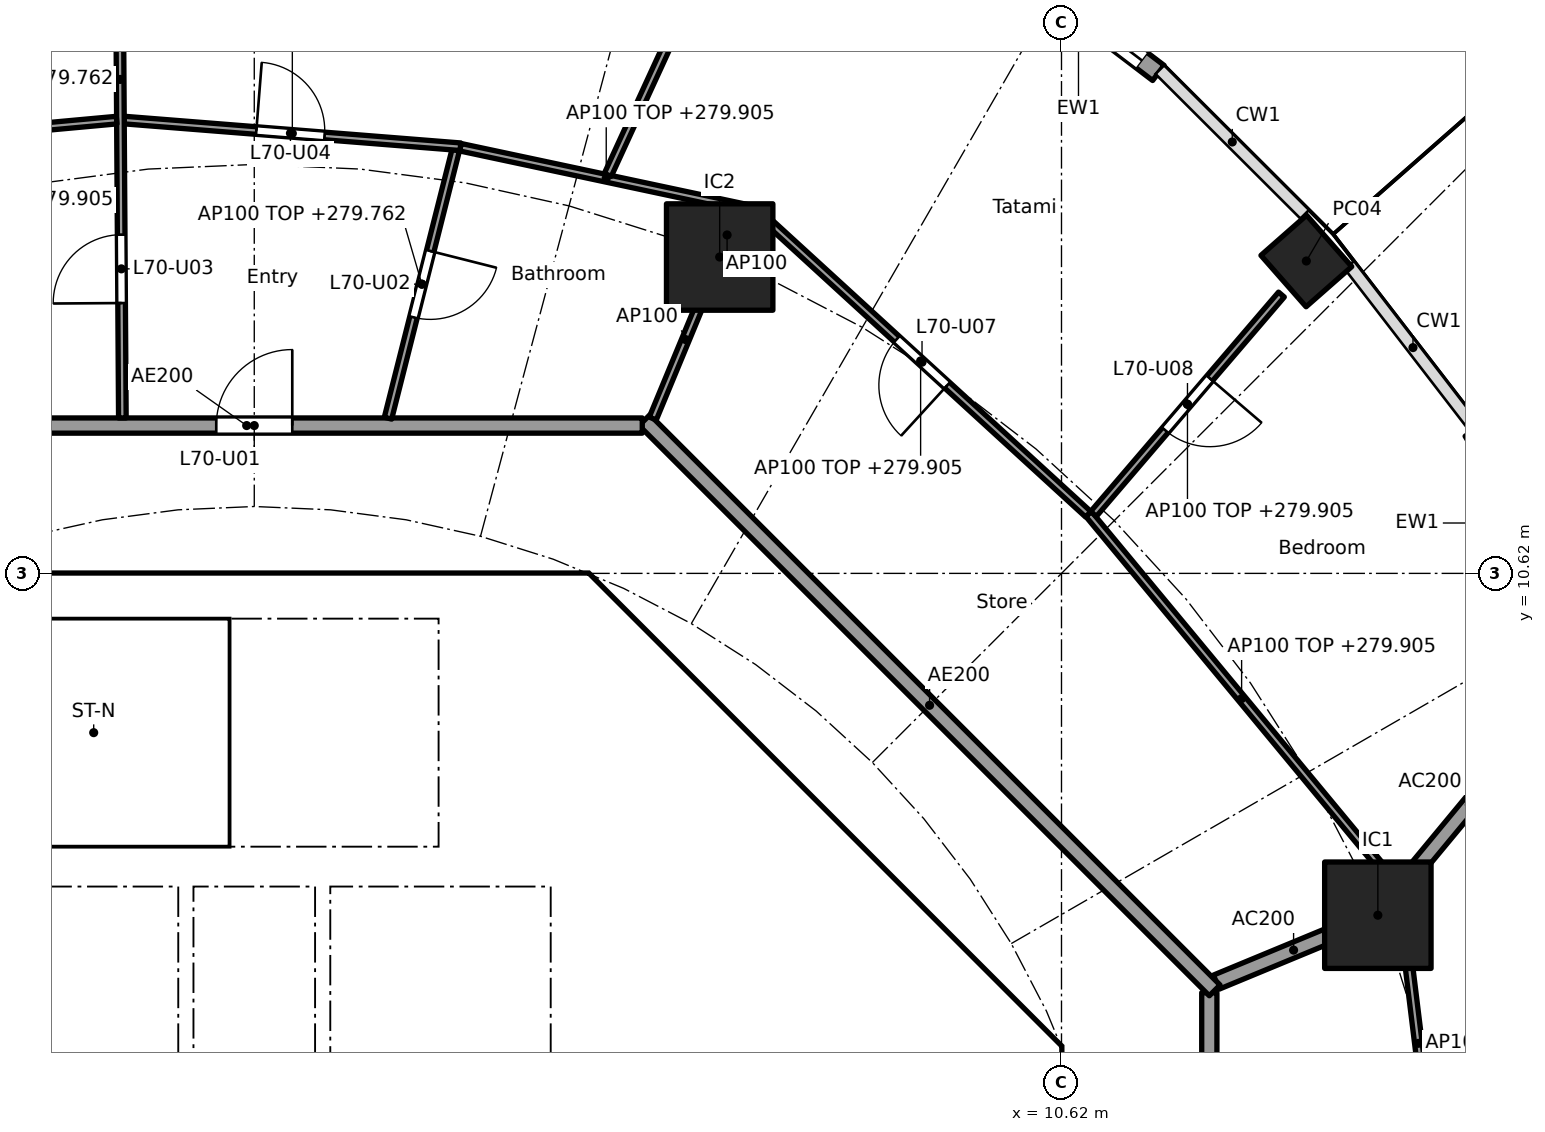
"""IFC4 building model, lengths in metres.
Left out: names, types, materials, properties, quantities, classifications, styles, units other than length and angle.
Written with IfcOpenShell. Run it as: python <this file> out.ifc"""

import sys

from ifc_helpers import new_model, si_unit, direction, frame, frame_2d, origin, origin_2d, place, context, subcontext, project, spatial, polyline, rectangle, hollow_rectangle, outline, extrude, element, fill, save


model = new_model("IFC4")
c1 = context("Model", 3, precision=1e-05, world=origin(), true_north=direction((0.0, 1.0)))
c2 = subcontext(c1, "Body", "Model", "MODEL_VIEW")
j1 = project(units=[si_unit("LENGTHUNIT", "METRE"), si_unit("PLANEANGLEUNIT", "RADIAN")], contexts=[c1])
p1 = place(None, origin())
s1 = spatial("IfcSite", under=j1, at=p1, CompositionType="ELEMENT")
p2 = place(p1, origin())
s2 = spatial("IfcBuilding", under=s1, at=p2, CompositionType="ELEMENT")
p3 = place(p2, frame((0.0, 0.0, 277.0)))
s3 = spatial("IfcBuildingStorey", under=s2, at=p3, CompositionType="ELEMENT", Elevation=277.0)
p4 = place(p3, frame((13.841, 14.73, 0.0), z_axis=(0.0, 0.0, 1.0), x_axis=(-0.660114607735, 0.751164898445, 0.0)))
e1 = element("IfcColumn", 1, at=p4, inside=s3, PredefinedType="COLUMN", context=c2, shape_type="SweptSolid", body=[
    extrude(hollow_rectangle(XDim=0.9, YDim=0.8, WallThickness=0.028, at=origin_2d()), origin(), (0.0, 0.0, 1.0), 3.7),
])
for number, where, z_axis, x_axis in (
    (2, (14.782, 6.123, 0.0), (0.0, 0.0, 1.0), (1.0, 0.0, 0.0)),
    (3, (6.123, 14.782, 0.0), (0.0, 0.0, 1.0), (1.0, 0.0, 0.0)),
):
    element("IfcColumn", number, at=place(p3, frame(where, z_axis=z_axis, x_axis=x_axis)), inside=s3, PredefinedType="COLUMN", context=c2, shape_type="SweptSolid", body=[
        extrude(rectangle(XDim=1.4, YDim=1.4, at=origin_2d()), origin(), (0.0, 0.0, 1.0), 3.7),
    ])
p5 = place(p3, frame((16.038, 12.489, 0.0), z_axis=(0.0, 0.0, 1.0), x_axis=(0.506371364425, -0.862315511452, 0.0)))
e4 = element("IfcWall", 4, at=p5, inside=s3, PredefinedType="SOLIDWALL", context=c2, shape_type="SweptSolid", body=[
    extrude(rectangle(XDim=2.796, YDim=0.25, at=frame_2d((1.398, 0.0))), origin(), (0.0, 0.0, 1.0), 3.44),
])
p6 = place(p5, frame((0.348, 0.0, 0.0)))
e5 = element("IfcOpeningElement", 5, at=p6, cuts=e4, PredefinedType="OPENING", context=c2, shape_type="SweptSolid", body=[
    extrude(rectangle(XDim=2.1, YDim=2.4, at=frame_2d((1.05, 1.2))), frame((0.0, 0.135, 0.0), z_axis=(0.0, -1.0, 0.0), x_axis=(1.0, 0.0, 0.0)), (0.0, 0.0, 1.0), 0.27),
])
p7 = place(p3, frame((9.792, 18.802, 0.0), z_axis=(0.0, 0.0, 1.0), x_axis=(0.796010739377, -0.605282498339, 0.0)))
e6 = element("IfcWall", 6, at=p7, inside=s3, PredefinedType="SOLIDWALL", context=c2, shape_type="SweptSolid", body=[
    extrude(rectangle(XDim=2.641, YDim=0.25, at=frame_2d((1.32, 0.0))), origin(), (0.0, 0.0, 1.0), 3.44),
])
p8 = place(p7, frame((0.27, 0.0, 0.0)))
e7 = element("IfcOpeningElement", 7, at=p8, cuts=e6, PredefinedType="OPENING", context=c2, shape_type="SweptSolid", body=[
    extrude(rectangle(XDim=2.1, YDim=2.4, at=frame_2d((1.05, 1.2))), frame((0.0, 0.135, 0.0), z_axis=(0.0, -1.0, 0.0), x_axis=(1.0, 0.0, 0.0)), (0.0, 0.0, 1.0), 0.27),
])
p9 = place(p3, frame((9.988, 4.613, 0.0), z_axis=(0.0, 0.0, 1.0), x_axis=(-0.707106781187, 0.707106781187, 0.0)))
e8 = element("IfcWall", 8, at=p9, inside=s3, PredefinedType="SHEAR", context=c2, shape_type="SweptSolid", body=[
    extrude(rectangle(XDim=7.602, YDim=0.6, at=frame_2d((3.801, 0.0))), origin(), (0.0, 0.0, 1.0), 3.44),
])
p10 = place(p9, frame((3.201, 0.0, 0.0)))
e9 = element("IfcOpeningElement", 9, at=p10, cuts=e8, PredefinedType="OPENING", context=c2, shape_type="SweptSolid", body=[
    extrude(rectangle(XDim=1.2, YDim=2.1, at=frame_2d((0.6, 1.05))), frame((0.0, 0.31, 0.0), z_axis=(0.0, -1.0, 0.0), x_axis=(1.0, 0.0, 0.0)), (0.0, 0.0, 1.0), 0.62),
])
p11 = place(p3, frame((4.0, 4.3, 0.0), z_axis=(0.0, 0.0, 1.0), x_axis=(0.0, 1.0, 0.0)))
e10 = element("IfcWall", 10, at=p11, inside=s3, PredefinedType="SOLIDWALL", context=c2, shape_type="SweptSolid", body=[
    extrude(rectangle(XDim=2.2, YDim=0.2, at=frame_2d((1.1, 0.0))), origin(), (0.0, 0.0, 1.0), 3.44),
])
p12 = place(p11, frame((0.55, 0.0, 0.0)))
e11 = element("IfcOpeningElement", 11, at=p12, cuts=e10, PredefinedType="OPENING", context=c2, shape_type="SweptSolid", body=[
    extrude(rectangle(XDim=1.1, YDim=2.1, at=frame_2d((0.55, 1.05))), frame((0.0, 0.11, 0.0), z_axis=(0.0, -1.0, 0.0), x_axis=(1.0, 0.0, 0.0)), (0.0, 0.0, 1.0), 0.22),
])
p13 = place(p3, frame((4.0, 7.025, 0.0), z_axis=(0.0, 0.0, 1.0), x_axis=(0.0, 1.0, 0.0)))
e12 = element("IfcWall", 12, at=p13, inside=s3, PredefinedType="SOLIDWALL", context=c2, shape_type="SweptSolid", body=[
    extrude(rectangle(XDim=3.0, YDim=0.2, at=frame_2d((1.5, 0.0))), origin(), (0.0, 0.0, 1.0), 3.44),
])
p14 = place(p13, frame((0.925, 0.0, 0.0)))
e13 = element("IfcOpeningElement", 13, at=p14, cuts=e12, PredefinedType="OPENING", context=c2, shape_type="SweptSolid", body=[
    extrude(rectangle(XDim=1.1, YDim=2.1, at=frame_2d((0.55, 1.05))), frame((0.0, 0.11, 0.0), z_axis=(0.0, -1.0, 0.0), x_axis=(1.0, 0.0, 0.0)), (0.0, 0.0, 1.0), 0.22),
])
p15 = place(p3, origin())
e14 = element("IfcWall", 14, at=p15, inside=s3, PredefinedType="SHEAR", context=c2, shape_type="SweptSolid", body=[
    extrude(outline(polyline([(-4.152, 10.025), (-4.401, 9.776), (-4.825, 10.2), (-4.401, 10.625), (4.401, 10.625), (4.825, 10.2), (4.401, 9.776), (4.152, 10.025), (-4.152, 10.025)])), origin(), (0.0, 0.0, 1.0), 3.44),
])
p16 = place(p3, origin())
e15 = element("IfcWall", 15, at=p16, inside=s3, PredefinedType="SHEAR", context=c2, shape_type="SweptSolid", body=[
    extrude(outline(polyline([(9.776, -4.401), (10.025, -4.152), (10.025, -3.801), (10.025, 4.152), (9.776, 4.401), (10.2, 4.825), (10.625, 4.401), (10.625, -4.401), (10.2, -4.825), (9.776, -4.401)])), origin(), (0.0, 0.0, 1.0), 3.44),
])
for number, where, z_axis, x_axis in (
    (16, (-0.9, 4.3, 0.0), (0.0, 0.0, 1.0), (0.0, 1.0, 0.0)),
    (17, (0.9, 4.3, 0.0), (0.0, 0.0, 1.0), (0.0, 1.0, 0.0)),
):
    element("IfcWall", number, at=place(p3, frame(where, z_axis=z_axis, x_axis=x_axis)), inside=s3, PredefinedType="SOLIDWALL", context=c2, shape_type="SweptSolid", body=[
        extrude(rectangle(XDim=2.2, YDim=0.2, at=frame_2d((1.1, 0.0))), origin(), (0.0, 0.0, 1.0), 3.44),
    ])
p17 = place(p3, origin())
e18 = element("IfcWall", 18, at=p17, inside=s3, PredefinedType="SOLIDWALL", context=c2, shape_type="SweptSolid", body=[
    extrude(outline(polyline([(4.1, 6.5), (-4.1, 6.5), (-4.1, 7.025), (4.1, 7.025), (4.1, 6.5)])), origin(), (0.0, 0.0, 1.0), 3.44),
])
p18 = place(p3, frame((12.657, 5.243, 0.0), z_axis=(0.0, 0.0, 1.0), x_axis=(0.923853160736, 0.382747093259, 0.0)))
e19 = element("IfcWall", 19, at=p18, inside=s3, PredefinedType="PARTITIONING", context=c2, shape_type="SweptSolid", body=[
    extrude(rectangle(XDim=2.2, YDim=0.2, at=frame_2d((1.1, 0.0))), origin(), (0.0, 0.0, 1.0), 3.44),
])
p19 = place(p3, frame((14.814, 6.161, 0.0), z_axis=(0.0, 0.0, 1.0), x_axis=(0.638050520313, 0.769994502272, 0.0)))
e20 = element("IfcWall", 20, at=p19, inside=s3, PredefinedType="PARTITIONING", context=c2, shape_type="SweptSolid", body=[
    extrude(rectangle(XDim=3.673, YDim=0.2, at=frame_2d((1.836, 0.0))), origin(), (0.0, 0.0, 1.0), 3.44),
])
p20 = place(p3, frame((12.565, -5.104, 0.0), z_axis=(0.0, 0.0, 1.0), x_axis=(0.0, 1.0, 0.0)))
e21 = element("IfcWall", 21, at=p20, inside=s3, PredefinedType="PARTITIONING", context=c2, shape_type="SweptSolid", body=[
    extrude(rectangle(XDim=10.209, YDim=0.2, at=frame_2d((5.104, 0.0))), origin(), (0.0, 0.0, 1.0), 3.44),
])
p21 = place(p20, frame((4.604, 0.0, 0.0)))
e22 = element("IfcOpeningElement", 22, at=p21, cuts=e21, PredefinedType="OPENING", context=c2, shape_type="SweptSolid", body=[
    extrude(rectangle(XDim=1.0, YDim=2.1, at=frame_2d((0.5, 1.05))), frame((0.0, 0.11, 0.0), z_axis=(0.0, -1.0, 0.0), x_axis=(1.0, 0.0, 0.0)), (0.0, 0.0, 1.0), 0.22),
])
p22 = place(p3, frame((12.635, 5.134, 0.0), z_axis=(0.0, 0.0, 1.0), x_axis=(-0.707106781187, 0.707106781187, 0.0)))
e23 = element("IfcWall", 23, at=p22, inside=s3, PredefinedType="PARTITIONING", context=c2, shape_type="SweptSolid", body=[
    extrude(rectangle(XDim=10.609, YDim=0.2, at=frame_2d((5.305, 0.0))), origin(), (0.0, 0.0, 1.0), 3.44),
])
p23 = place(p3, frame((5.104, 12.565, 0.0), z_axis=(0.0, 0.0, 1.0), x_axis=(-1.0, 0.0, 0.0)))
e24 = element("IfcWall", 24, at=p23, inside=s3, PredefinedType="PARTITIONING", context=c2, shape_type="SweptSolid", body=[
    extrude(rectangle(XDim=10.409, YDim=0.2, at=frame_2d((5.205, 0.0))), origin(), (0.0, 0.0, 1.0), 3.44),
])
p24 = place(p23, frame((4.604, 0.0, 0.0)))
e25 = element("IfcOpeningElement", 25, at=p24, cuts=e24, PredefinedType="OPENING", context=c2, shape_type="SweptSolid", body=[
    extrude(rectangle(XDim=1.0, YDim=2.1, at=frame_2d((0.5, 1.05))), frame((0.0, 0.11, 0.0), z_axis=(0.0, -1.0, 0.0), x_axis=(1.0, 0.0, 0.0)), (0.0, 0.0, 1.0), 0.22),
])
p25 = place(p3, frame((15.552, 2.508, 0.0), z_axis=(0.0, 0.0, 1.0), x_axis=(-0.12196293976, 0.992534654974, 0.0)))
e26 = element("IfcWall", 26, at=p25, inside=s3, PredefinedType="PARTITIONING", context=c2, shape_type="SweptSolid", body=[
    extrude(rectangle(XDim=3.887, YDim=0.1, at=frame_2d((1.944, 0.0))), origin(), (0.0, 0.0, 1.0), 2.905),
])
p26 = place(p3, frame((15.002, 6.543, 0.0), z_axis=(0.0, 0.0, 1.0), x_axis=(-0.637932656528, 0.770092154054, 0.0)))
e27 = element("IfcWall", 27, at=p26, inside=s3, PredefinedType="PARTITIONING", context=c2, shape_type="SweptSolid", body=[
    extrude(rectangle(XDim=6.311, YDim=0.1, at=frame_2d((3.155, 0.0))), origin(), (0.0, 0.0, 1.0), 2.905),
])
p27 = place(p3, frame((11.041, 11.402, 0.0), z_axis=(0.0, 0.0, 1.0), x_axis=(0.650558544325, 0.759456108282, 0.0)))
e28 = element("IfcWall", 28, at=p27, inside=s3, PredefinedType="PARTITIONING", context=c2, shape_type="SweptSolid", body=[
    extrude(rectangle(XDim=3.8, YDim=0.1, at=frame_2d((1.9, 0.0))), origin(), (0.0, 0.0, 1.0), 2.905),
])
p28 = place(p27, frame((1.45, 0.0, 0.0)))
e29 = element("IfcOpeningElement", 29, at=p28, cuts=e28, PredefinedType="OPENING", context=c2, shape_type="SweptSolid", body=[
    extrude(rectangle(XDim=0.9, YDim=2.1, at=frame_2d((0.45, 1.05))), frame((0.0, 0.06, 0.0), z_axis=(0.0, -1.0, 0.0), x_axis=(1.0, 0.0, 0.0)), (0.0, 0.0, 1.0), 0.12),
])
p29 = place(p3, frame((10.972, 11.398, 0.0), z_axis=(0.0, 0.0, 1.0), x_axis=(-0.737838738013, 0.674977034193, 0.0)))
e30 = element("IfcWall", 30, at=p29, inside=s3, PredefinedType="PARTITIONING", context=c2, shape_type="SweptSolid", body=[
    extrude(rectangle(XDim=5.977, YDim=0.1, at=frame_2d((2.989, 0.0))), origin(), (0.0, 0.0, 1.0), 2.905),
])
p30 = place(p29, frame((2.514, 0.0, 0.0)))
e31 = element("IfcOpeningElement", 31, at=p30, cuts=e30, PredefinedType="OPENING", context=c2, shape_type="SweptSolid", body=[
    extrude(rectangle(XDim=0.9, YDim=2.1, at=frame_2d((0.45, 1.05))), frame((0.0, 0.06, 0.0), z_axis=(0.0, -1.0, 0.0), x_axis=(1.0, 0.0, 0.0)), (0.0, 0.0, 1.0), 0.12),
])
p31 = place(p3, frame((5.243, 12.657, 0.0), z_axis=(0.0, 0.0, 1.0), x_axis=(0.382719158442, 0.923864733477, 0.0)))
e32 = element("IfcWall", 32, at=p31, inside=s3, PredefinedType="PARTITIONING", context=c2, shape_type="SweptSolid", body=[
    extrude(rectangle(XDim=2.25, YDim=0.1, at=frame_2d((1.125, 0.0))), origin(), (0.0, 0.0, 1.0), 3.44),
])
p32 = place(p3, frame((6.55, 15.409, 0.0), z_axis=(0.0, 0.0, 1.0), x_axis=(-0.978051195976, 0.208364723621, 0.0)))
e33 = element("IfcWall", 33, at=p32, inside=s3, PredefinedType="PARTITIONING", context=c2, shape_type="SweptSolid", body=[
    extrude(rectangle(XDim=3.924, YDim=0.1, at=frame_2d((1.962, 0.0))), origin(), (0.0, 0.0, 1.0), 2.905),
])
p33 = place(p3, frame((4.651, 15.863, 0.0), z_axis=(0.0, 0.0, 1.0), x_axis=(0.41744196735, 0.908703584176, 0.0)))
e34 = element("IfcWall", 34, at=p33, inside=s3, PredefinedType="PARTITIONING", context=c2, shape_type="SweptSolid", body=[
    extrude(rectangle(XDim=5.242, YDim=0.1, at=frame_2d((2.621, 0.0))), origin(), (0.0, 0.0, 1.0), 2.983),
])
p34 = place(p33, frame((2.171, 0.0, 0.0)))
e35 = element("IfcOpeningElement", 35, at=p34, cuts=e34, PredefinedType="OPENING", context=c2, shape_type="SweptSolid", body=[
    extrude(rectangle(XDim=0.9, YDim=2.1, at=frame_2d((0.45, 1.05))), frame((0.0, 0.06, 0.0), z_axis=(0.0, -1.0, 0.0), x_axis=(1.0, 0.0, 0.0)), (0.0, 0.0, 1.0), 0.12),
])
p35 = place(p3, frame((1.759, 12.662, 0.0), z_axis=(0.0, 0.0, 1.0), x_axis=(0.244966765147, 0.969531476525, 0.0)))
e36 = element("IfcWall", 36, at=p35, inside=s3, PredefinedType="PARTITIONING", context=c2, shape_type="SweptSolid", body=[
    extrude(rectangle(XDim=3.638, YDim=0.1, at=frame_2d((1.819, 0.0))), origin(), (0.0, 0.0, 1.0), 2.762),
])
p36 = place(p35, frame((1.369, 0.0, 0.0)))
e37 = element("IfcOpeningElement", 37, at=p36, cuts=e36, PredefinedType="OPENING", context=c2, shape_type="SweptSolid", body=[
    extrude(rectangle(XDim=0.9, YDim=2.1, at=frame_2d((0.45, 1.05))), frame((0.0, 0.06, 0.0), z_axis=(0.0, -1.0, 0.0), x_axis=(1.0, 0.0, 0.0)), (0.0, 0.0, 1.0), 0.12),
])
p37 = place(p3, frame((2.713, 16.233, 0.0), z_axis=(0.0, 0.0, 1.0), x_axis=(-0.996870142942, 0.079056423588, 0.0)))
e38 = element("IfcWall", 38, at=p37, inside=s3, PredefinedType="PARTITIONING", context=c2, shape_type="SweptSolid", body=[
    extrude(rectangle(XDim=4.438, YDim=0.1, at=frame_2d((2.219, 0.0))), origin(), (0.0, 0.0, 1.0), 2.905),
])
p38 = place(p37, frame((1.794, 0.0, 0.0)))
e39 = element("IfcOpeningElement", 39, at=p38, cuts=e38, PredefinedType="OPENING", context=c2, shape_type="SweptSolid", body=[
    extrude(rectangle(XDim=0.9, YDim=2.1, at=frame_2d((0.45, 1.05))), frame((0.0, 0.06, 0.0), z_axis=(0.0, -1.0, 0.0), x_axis=(1.0, 0.0, 0.0)), (0.0, 0.0, 1.0), 0.12),
])
p39 = place(p3, frame((-1.736, 12.665, 0.0), z_axis=(0.0, 0.0, 1.0), x_axis=(-0.00646827636, 0.999979080482, 0.0)))
e40 = element("IfcWall", 40, at=p39, inside=s3, PredefinedType="PARTITIONING", context=c2, shape_type="SweptSolid", body=[
    extrude(rectangle(XDim=8.908, YDim=0.1, at=frame_2d((4.454, 0.0))), origin(), (0.0, 0.0, 1.0), 2.762),
])
p40 = place(p39, frame((1.512, 0.0, 0.0)))
e41 = element("IfcOpeningElement", 41, at=p40, cuts=e40, PredefinedType="OPENING", context=c2, shape_type="SweptSolid", body=[
    extrude(rectangle(XDim=0.9, YDim=2.1, at=frame_2d((0.45, 1.05))), frame((0.0, 0.06, 0.0), z_axis=(0.0, -1.0, 0.0), x_axis=(1.0, 0.0, 0.0)), (0.0, 0.0, 1.0), 0.12),
])
p41 = place(p39, frame((5.965, 0.0, 0.0)))
e42 = element("IfcOpeningElement", 42, at=p41, cuts=e40, PredefinedType="OPENING", context=c2, shape_type="SweptSolid", body=[
    extrude(rectangle(XDim=0.9, YDim=2.1, at=frame_2d((0.45, 1.05))), frame((0.0, 0.06, 0.0), z_axis=(0.0, -1.0, 0.0), x_axis=(1.0, 0.0, 0.0)), (0.0, 0.0, 1.0), 0.12),
])
p42 = place(p3, frame((-1.811, 16.583, 0.0), z_axis=(0.0, 0.0, 1.0), x_axis=(-0.995842301034, -0.091093970555, 0.0)))
e43 = element("IfcWall", 43, at=p42, inside=s3, PredefinedType="PARTITIONING", context=c2, shape_type="SweptSolid", body=[
    extrude(rectangle(XDim=4.535, YDim=0.1, at=frame_2d((2.267, 0.0))), origin(), (0.0, 0.0, 1.0), 2.905),
])
p43 = place(p3, frame((6.388, 15.29, 0.0), z_axis=(0.0, 0.0, 1.0), x_axis=(-0.610612392422, -0.791929609385, 0.0)))
e44 = element("IfcWall", 44, at=p43, inside=s3, PredefinedType="PARTITIONING", context=c2, shape_type="SweptSolid", body=[
    extrude(rectangle(XDim=0.549, YDim=0.1, at=frame_2d((0.275, 0.0))), origin(), (0.0, 0.0, 1.0), 3.44),
])
p44 = place(p8, origin())
e45 = element("IfcDoor", 45, at=p44, inside=s3, OperationType="SLIDING_TO_LEFT", PredefinedType="DOOR", context=c2, shape_type="SweptSolid", body=[
    extrude(rectangle(XDim=2.1, YDim=2.4, at=frame_2d((1.05, 1.2))), frame((0.0, 0.025, 0.0), z_axis=(0.0, -1.0, 0.0), x_axis=(1.0, 0.0, 0.0)), (0.0, 0.0, 1.0), 0.05),
])
fill(e7, e45)
p45 = place(p12, origin())
e46 = element("IfcDoor", 46, at=p45, inside=s3, OperationType="DOUBLE_DOOR_SLIDING", PredefinedType="DOOR", context=c2, shape_type="SweptSolid", body=[
    extrude(rectangle(XDim=1.1, YDim=2.1, at=frame_2d((0.55, 1.05))), frame((0.0, 0.025, 0.0), z_axis=(0.0, -1.0, 0.0), x_axis=(1.0, 0.0, 0.0)), (0.0, 0.0, 1.0), 0.05),
])
fill(e11, e46)
p46 = place(p14, origin())
e47 = element("IfcDoor", 47, at=p46, inside=s3, OperationType="SINGLE_SWING_LEFT", PredefinedType="DOOR", context=c2, shape_type="SweptSolid", body=[
    extrude(rectangle(XDim=1.1, YDim=2.1, at=frame_2d((0.55, 1.05))), frame((0.0, 0.025, 0.0), z_axis=(0.0, -1.0, 0.0), x_axis=(1.0, 0.0, 0.0)), (0.0, 0.0, 1.0), 0.05),
])
fill(e13, e47)
p47 = place(p10, origin())
e48 = element("IfcDoor", 48, at=p47, inside=s3, OperationType="SINGLE_SWING_RIGHT", PredefinedType="DOOR", context=c2, shape_type="SweptSolid", body=[
    extrude(rectangle(XDim=1.2, YDim=2.1, at=frame_2d((0.6, 1.05))), frame((0.0, 0.025, 0.0), z_axis=(0.0, -1.0, 0.0), x_axis=(1.0, 0.0, 0.0)), (0.0, 0.0, 1.0), 0.05),
])
fill(e9, e48)
p48 = place(p24, frame((1.0, 0.0, 0.0), x_axis=(-1.0, 0.0, 0.0)))
e49 = element("IfcDoor", 49, at=p48, inside=s3, OperationType="SINGLE_SWING_RIGHT", PredefinedType="DOOR", context=c2, shape_type="SweptSolid", body=[
    extrude(rectangle(XDim=1.0, YDim=2.1, at=frame_2d((0.5, 1.05))), frame((0.0, 0.025, 0.0), z_axis=(0.0, -1.0, 0.0), x_axis=(1.0, 0.0, 0.0)), (0.0, 0.0, 1.0), 0.05),
])
fill(e25, e49)
p49 = place(p36, frame((0.9, 0.0, 0.0), x_axis=(-1.0, 0.0, 0.0)))
e50 = element("IfcDoor", 50, at=p49, inside=s3, OperationType="SINGLE_SWING_LEFT", PredefinedType="DOOR", context=c2, shape_type="SweptSolid", body=[
    extrude(rectangle(XDim=0.9, YDim=2.1, at=frame_2d((0.45, 1.05))), frame((0.0, 0.025, 0.0), z_axis=(0.0, -1.0, 0.0), x_axis=(1.0, 0.0, 0.0)), (0.0, 0.0, 1.0), 0.05),
])
fill(e37, e50)
p50 = place(p40, origin())
e51 = element("IfcDoor", 51, at=p50, inside=s3, OperationType="SINGLE_SWING_LEFT", PredefinedType="DOOR", context=c2, shape_type="SweptSolid", body=[
    extrude(rectangle(XDim=0.9, YDim=2.1, at=frame_2d((0.45, 1.05))), frame((0.0, 0.025, 0.0), z_axis=(0.0, -1.0, 0.0), x_axis=(1.0, 0.0, 0.0)), (0.0, 0.0, 1.0), 0.05),
])
fill(e41, e51)
p51 = place(p38, frame((0.9, 0.0, 0.0), x_axis=(-1.0, 0.0, 0.0)))
e52 = element("IfcDoor", 52, at=p51, inside=s3, OperationType="SINGLE_SWING_LEFT", PredefinedType="DOOR", context=c2, shape_type="SweptSolid", body=[
    extrude(rectangle(XDim=0.9, YDim=2.1, at=frame_2d((0.45, 1.05))), frame((0.0, 0.025, 0.0), z_axis=(0.0, -1.0, 0.0), x_axis=(1.0, 0.0, 0.0)), (0.0, 0.0, 1.0), 0.05),
])
fill(e39, e52)
p52 = place(p30, origin())
e53 = element("IfcDoor", 53, at=p52, inside=s3, OperationType="SINGLE_SWING_LEFT", PredefinedType="DOOR", context=c2, shape_type="SweptSolid", body=[
    extrude(rectangle(XDim=0.9, YDim=2.1, at=frame_2d((0.45, 1.05))), frame((0.0, 0.025, 0.0), z_axis=(0.0, -1.0, 0.0), x_axis=(1.0, 0.0, 0.0)), (0.0, 0.0, 1.0), 0.05),
])
fill(e31, e53)
p53 = place(p28, frame((0.9, 0.0, 0.0), x_axis=(-1.0, 0.0, 0.0)))
e54 = element("IfcDoor", 54, at=p53, inside=s3, OperationType="SINGLE_SWING_LEFT", PredefinedType="DOOR", context=c2, shape_type="SweptSolid", body=[
    extrude(rectangle(XDim=0.9, YDim=2.1, at=frame_2d((0.45, 1.05))), frame((0.0, 0.025, 0.0), z_axis=(0.0, -1.0, 0.0), x_axis=(1.0, 0.0, 0.0)), (0.0, 0.0, 1.0), 0.05),
])
fill(e29, e54)
save(model, sys.argv[1])
